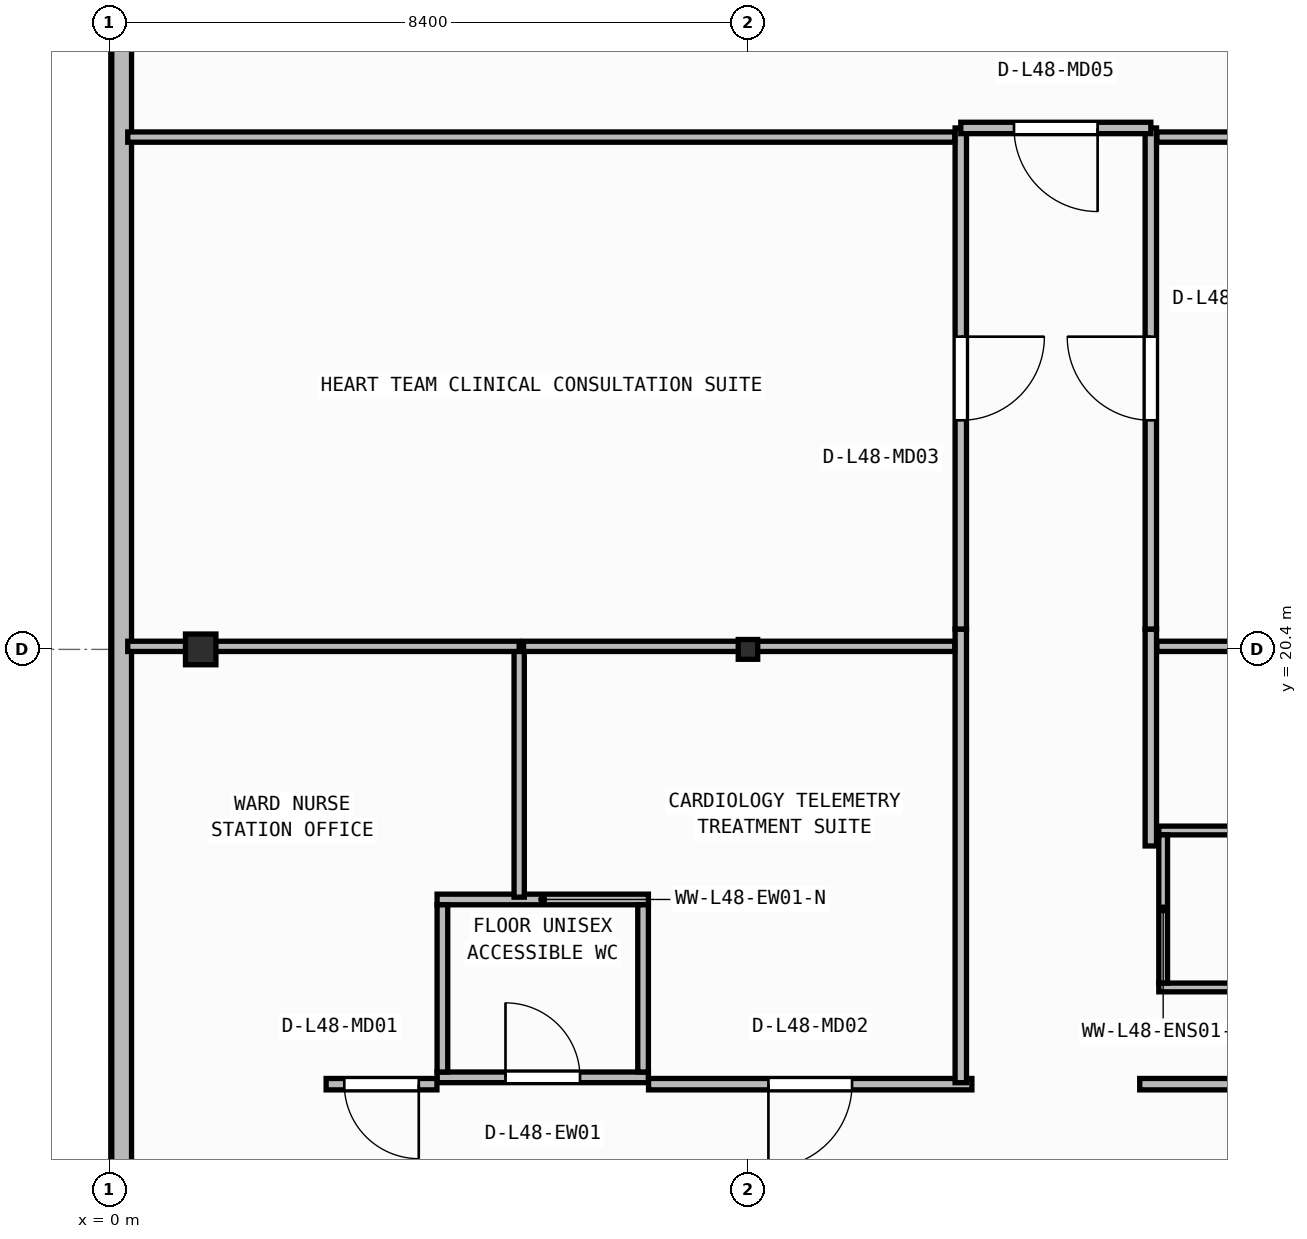
"""IFC4 building model, lengths in metres.
Left out: names, types, materials, properties, quantities, classifications, styles, units other than length and angle.
Written with IfcOpenShell. Run it as: python <this file> out.ifc"""

import sys

from ifc_helpers import new_model, si_unit, direction, frame, frame_2d, origin, origin_2d, place, context, subcontext, project, spatial, rectangle, i_section, extrude, element, fill, save


model = new_model("IFC4")
c1 = context("Model", 3, precision=1e-05, world=origin(), true_north=direction((0.0, 1.0)))
c2 = subcontext(c1, "Body", "Model", "MODEL_VIEW")
j1 = project(units=[si_unit("LENGTHUNIT", "METRE"), si_unit("PLANEANGLEUNIT", "RADIAN")], contexts=[c1])
p1 = place(None, origin())
s1 = spatial("IfcSite", under=j1, at=p1, CompositionType="ELEMENT")
p2 = place(p1, origin())
s2 = spatial("IfcBuilding", under=s1, at=p2, CompositionType="ELEMENT")
p3 = place(p2, frame((0.0, 0.0, 196.05)))
s3 = spatial("IfcBuildingStorey", under=s2, at=p3, CompositionType="ELEMENT", Elevation=196.05)
p4 = place(p3, frame((1.2, 20.4, 0.0), z_axis=(0.0, 0.0, 1.0), x_axis=(1.0, 0.0, 0.0)))
e1 = element("IfcColumn", 1, at=p4, inside=s3, PredefinedType="COLUMN", context=c2, shape_type="SweptSolid", body=[
    extrude(i_section(OverallWidth=0.4, OverallDepth=0.404, WebThickness=0.02, FlangeThickness=0.032, at=origin_2d()), origin(), (0.0, 0.0, 1.0), 3.95),
])
p5 = place(p3, frame((8.4, 20.4, 0.0), z_axis=(0.0, 0.0, 1.0), x_axis=(1.0, 0.0, 0.0)))
e2 = element("IfcColumn", 2, at=p5, inside=s3, PredefinedType="COLUMN", context=c2, shape_type="SweptSolid", body=[
    extrude(i_section(OverallWidth=0.256, OverallDepth=0.26, WebThickness=0.01, FlangeThickness=0.017, FilletRadius=0.013, at=origin_2d()), origin(), (0.0, 0.0, 1.0), 3.95),
])
p6 = place(p3, frame((0.16, 40.14, 0.0), z_axis=(0.0, 0.0, 1.0), x_axis=(0.0, -1.0, 0.0)))
e3 = element("IfcWall", 3, at=p6, inside=s3, PredefinedType="STANDARD", context=c2, shape_type="SweptSolid", body=[
    extrude(rectangle(XDim=37.48, YDim=0.26, at=frame_2d((18.74, 0.0))), origin(), (0.0, 0.0, 1.0), 3.71),
])
p7 = place(p6, frame((27.4, 0.0, 0.9)))
e4 = element("IfcOpeningElement", 4, at=p7, cuts=e3, PredefinedType="OPENING", context=c2, shape_type="SweptSolid", body=[
    extrude(rectangle(XDim=2.4, YDim=1.65, at=frame_2d((1.2, 0.825))), frame((0.0, 0.14, 0.0), z_axis=(0.0, -1.0, 0.0), x_axis=(1.0, 0.0, 0.0)), (0.0, 0.0, 1.0), 0.28),
])
p8 = place(p3, frame((4.31, 14.77, 0.0), z_axis=(0.0, 0.0, 1.0), x_axis=(1.0, 0.0, 0.0)))
e5 = element("IfcWall", 5, at=p8, inside=s3, PredefinedType="PARTITIONING", context=c2, shape_type="SweptSolid", body=[
    extrude(rectangle(XDim=2.78, YDim=0.14, at=frame_2d((1.39, 0.0))), origin(), (0.0, 0.0, 1.0), 3.71),
])
p9 = place(p8, frame((0.9, 0.0, 0.0)))
e6 = element("IfcOpeningElement", 6, at=p9, cuts=e5, PredefinedType="OPENING", context=c2, shape_type="SweptSolid", body=[
    extrude(rectangle(XDim=0.98, YDim=2.1, at=frame_2d((0.49, 1.05))), frame((0.0, 0.08, 0.0), z_axis=(0.0, -1.0, 0.0), x_axis=(1.0, 0.0, 0.0)), (0.0, 0.0, 1.0), 0.16),
])
p10 = place(p3, frame((4.31, 17.11, 0.0), z_axis=(0.0, 0.0, 1.0), x_axis=(1.0, 0.0, 0.0)))
e7 = element("IfcWall", 7, at=p10, inside=s3, PredefinedType="PARTITIONING", context=c2, shape_type="SweptSolid", body=[
    extrude(rectangle(XDim=2.78, YDim=0.14, at=frame_2d((1.39, 0.0))), origin(), (0.0, 0.0, 1.0), 3.71),
])
for number, where, z_axis, x_axis in (
    (8, (4.38, 14.84, 0.0), (0.0, 0.0, 1.0), (0.0, 1.0, 0.0)),
    (9, (7.02, 14.84, 0.0), (0.0, 0.0, 1.0), (0.0, 1.0, 0.0)),
):
    element("IfcWall", number, at=place(p3, frame(where, z_axis=z_axis, x_axis=x_axis)), inside=s3, PredefinedType="PARTITIONING", context=c2, shape_type="SweptSolid", body=[
        extrude(rectangle(XDim=2.2, YDim=0.14, at=frame_2d((1.1, 0.0))), origin(), (0.0, 0.0, 1.0), 3.71),
    ])
for number, where, z_axis, x_axis in (
    (10, (13.805, 15.952, 0.0), (0.0, 0.0, 1.0), (1.0, 0.0, 0.0)),
    (11, (13.805, 18.018, 0.0), (0.0, 0.0, 1.0), (1.0, 0.0, 0.0)),
):
    element("IfcWall", number, at=place(p3, frame(where, z_axis=z_axis, x_axis=x_axis)), inside=s3, PredefinedType="PARTITIONING", context=c2, shape_type="SweptSolid", body=[
        extrude(rectangle(XDim=2.15, YDim=0.115, at=frame_2d((1.075, 0.0))), origin(), (0.0, 0.0, 1.0), 3.71),
    ])
p11 = place(p3, frame((13.863, 16.01, 0.0), z_axis=(0.0, 0.0, 1.0), x_axis=(0.0, 1.0, 0.0)))
e12 = element("IfcWall", 12, at=p11, inside=s3, PredefinedType="PARTITIONING", context=c2, shape_type="SweptSolid", body=[
    extrude(rectangle(XDim=1.95, YDim=0.115, at=frame_2d((0.975, 0.0))), origin(), (0.0, 0.0, 1.0), 3.71),
])
p12 = place(p3, frame((4.308, 14.68, 0.0), z_axis=(0.0, 0.0, 1.0), x_axis=(-1.0, 0.0, 0.0)))
e13 = element("IfcWall", 13, at=p12, inside=s3, PredefinedType="PARTITIONING", context=c2, shape_type="SweptSolid", body=[
    extrude(rectangle(XDim=1.458, YDim=0.15, at=frame_2d((0.729, 0.0))), origin(), (0.0, 0.0, 1.0), 3.71),
])
p13 = place(p12, frame((0.239, 0.0, 0.0)))
e14 = element("IfcOpeningElement", 14, at=p13, cuts=e13, PredefinedType="OPENING", context=c2, shape_type="SweptSolid", body=[
    extrude(rectangle(XDim=0.98, YDim=2.1, at=frame_2d((0.49, 1.05))), frame((0.0, 0.085, 0.0), z_axis=(0.0, -1.0, 0.0), x_axis=(1.0, 0.0, 0.0)), (0.0, 0.0, 1.0), 0.17),
])
p14 = place(p3, frame((11.346, 14.68, 0.0), z_axis=(0.0, 0.0, 1.0), x_axis=(-1.0, 0.0, 0.0)))
e15 = element("IfcWall", 15, at=p14, inside=s3, PredefinedType="PARTITIONING", context=c2, shape_type="SweptSolid", body=[
    extrude(rectangle(XDim=4.254, YDim=0.15, at=frame_2d((2.127, 0.0))), origin(), (0.0, 0.0, 1.0), 3.71),
])
p15 = place(p14, frame((1.577, 0.0, 0.0)))
e16 = element("IfcOpeningElement", 16, at=p15, cuts=e15, PredefinedType="OPENING", context=c2, shape_type="SweptSolid", body=[
    extrude(rectangle(XDim=1.1, YDim=2.1, at=frame_2d((0.55, 1.05))), frame((0.0, 0.085, 0.0), z_axis=(0.0, -1.0, 0.0), x_axis=(1.0, 0.0, 0.0)), (0.0, 0.0, 1.0), 0.17),
])
p16 = place(p3, frame((18.966, 14.68, 0.0), z_axis=(0.0, 0.0, 1.0), x_axis=(-1.0, 0.0, 0.0)))
e17 = element("IfcWall", 17, at=p16, inside=s3, PredefinedType="PARTITIONING", context=c2, shape_type="SweptSolid", body=[
    extrude(rectangle(XDim=5.412, YDim=0.15, at=frame_2d((2.706, 0.0))), origin(), (0.0, 0.0, 1.0), 3.71),
])
p17 = place(p16, frame((2.056, 0.0, 0.0)))
e18 = element("IfcOpeningElement", 18, at=p17, cuts=e17, PredefinedType="OPENING", context=c2, shape_type="SweptSolid", body=[
    extrude(rectangle(XDim=1.3, YDim=2.15, at=frame_2d((0.65, 1.075))), frame((0.0, 0.085, 0.0), z_axis=(0.0, -1.0, 0.0), x_axis=(1.0, 0.0, 0.0)), (0.0, 0.0, 1.0), 0.17),
])
p18 = place(p3, frame((11.2, 20.666, 0.0), z_axis=(0.0, 0.0, 1.0), x_axis=(0.0, -1.0, 0.0)))
e19 = element("IfcWall", 19, at=p18, inside=s3, PredefinedType="PARTITIONING", context=c2, shape_type="SweptSolid", body=[
    extrude(rectangle(XDim=5.966, YDim=0.15, at=frame_2d((2.983, 0.0))), origin(), (0.0, 0.0, 1.0), 3.71),
])
p19 = place(p3, frame((13.7, 17.814, 0.0), z_axis=(0.0, 0.0, 1.0), x_axis=(0.0, 1.0, 0.0)))
e20 = element("IfcWall", 20, at=p19, inside=s3, PredefinedType="PARTITIONING", context=c2, shape_type="SweptSolid", body=[
    extrude(rectangle(XDim=2.852, YDim=0.15, at=frame_2d((1.426, 0.0))), origin(), (0.0, 0.0, 1.0), 3.71),
])
p20 = place(p3, frame((11.2, 27.26, 0.0), z_axis=(0.0, 0.0, 1.0), x_axis=(0.0, -1.0, 0.0)))
e21 = element("IfcWall", 21, at=p20, inside=s3, PredefinedType="PARTITIONING", context=c2, shape_type="SweptSolid", body=[
    extrude(rectangle(XDim=6.592, YDim=0.15, at=frame_2d((3.296, 0.0))), origin(), (0.0, 0.0, 1.0), 3.71),
])
p21 = place(p20, frame((2.746, 0.0, 0.0)))
e22 = element("IfcOpeningElement", 22, at=p21, cuts=e21, PredefinedType="OPENING", context=c2, shape_type="SweptSolid", body=[
    extrude(rectangle(XDim=1.1, YDim=2.1, at=frame_2d((0.55, 1.05))), frame((0.0, 0.085, 0.0), z_axis=(0.0, -1.0, 0.0), x_axis=(1.0, 0.0, 0.0)), (0.0, 0.0, 1.0), 0.17),
])
p22 = place(p3, frame((13.7, 20.668, 0.0), z_axis=(0.0, 0.0, 1.0), x_axis=(0.0, 1.0, 0.0)))
e23 = element("IfcWall", 23, at=p22, inside=s3, PredefinedType="PARTITIONING", context=c2, shape_type="SweptSolid", body=[
    extrude(rectangle(XDim=6.592, YDim=0.15, at=frame_2d((3.296, 0.0))), origin(), (0.0, 0.0, 1.0), 3.71),
])
p23 = place(p22, frame((2.746, 0.0, 0.0)))
e24 = element("IfcOpeningElement", 24, at=p23, cuts=e23, PredefinedType="OPENING", context=c2, shape_type="SweptSolid", body=[
    extrude(rectangle(XDim=1.1, YDim=2.1, at=frame_2d((0.55, 1.05))), frame((0.0, 0.085, 0.0), z_axis=(0.0, -1.0, 0.0), x_axis=(1.0, 0.0, 0.0)), (0.0, 0.0, 1.0), 0.17),
])
p24 = place(p3, frame((13.7, 27.26, 0.0), z_axis=(0.0, 0.0, 1.0), x_axis=(-1.0, 0.0, 0.0)))
e25 = element("IfcWall", 25, at=p24, inside=s3, PredefinedType="PARTITIONING", context=c2, shape_type="SweptSolid", body=[
    extrude(rectangle(XDim=2.5, YDim=0.15, at=frame_2d((1.25, 0.0))), origin(), (0.0, 0.0, 1.0), 3.71),
])
p25 = place(p24, frame((0.7, 0.0, 0.0)))
e26 = element("IfcOpeningElement", 26, at=p25, cuts=e25, PredefinedType="OPENING", context=c2, shape_type="SweptSolid", body=[
    extrude(rectangle(XDim=1.1, YDim=2.1, at=frame_2d((0.55, 1.05))), frame((0.0, 0.085, 0.0), z_axis=(0.0, -1.0, 0.0), x_axis=(1.0, 0.0, 0.0)), (0.0, 0.0, 1.0), 0.17),
])
p26 = place(p3, frame((5.39, 17.14, 0.0), z_axis=(0.0, 0.0, 1.0), x_axis=(0.0, 1.0, 0.0)))
e27 = element("IfcWall", 27, at=p26, inside=s3, PredefinedType="PARTITIONING", context=c2, shape_type="SweptSolid", body=[
    extrude(rectangle(XDim=3.3, YDim=0.135, at=frame_2d((1.65, 0.0))), origin(), (0.0, 0.0, 1.0), 3.71),
])
p27 = place(p3, frame((5.39, 20.44, 0.0), z_axis=(0.0, 0.0, 1.0), x_axis=(-1.0, 0.0, 0.0)))
e28 = element("IfcWall", 28, at=p27, inside=s3, PredefinedType="PARTITIONING", context=c2, shape_type="SweptSolid", body=[
    extrude(rectangle(XDim=5.15, YDim=0.135, at=frame_2d((2.575, 0.0))), origin(), (0.0, 0.0, 1.0), 3.152),
])
p28 = place(p3, frame((11.12, 20.44, 0.0), z_axis=(0.0, 0.0, 1.0), x_axis=(-1.0, 0.0, 0.0)))
e29 = element("IfcWall", 29, at=p28, inside=s3, PredefinedType="PARTITIONING", context=c2, shape_type="SweptSolid", body=[
    extrude(rectangle(XDim=5.673, YDim=0.135, at=frame_2d((2.836, 0.0))), origin(), (0.0, 0.0, 1.0), 3.152),
])
p29 = place(p3, frame((18.74, 20.44, 0.0), z_axis=(0.0, 0.0, 1.0), x_axis=(-1.0, 0.0, 0.0)))
e30 = element("IfcWall", 30, at=p29, inside=s3, PredefinedType="PARTITIONING", context=c2, shape_type="SweptSolid", body=[
    extrude(rectangle(XDim=4.96, YDim=0.135, at=frame_2d((2.48, 0.0))), origin(), (0.0, 0.0, 1.0), 3.152),
])
p30 = place(p3, frame((11.12, 27.14, 0.0), z_axis=(0.0, 0.0, 1.0), x_axis=(-1.0, 0.0, 0.0)))
e31 = element("IfcWall", 31, at=p30, inside=s3, PredefinedType="PARTITIONING", context=c2, shape_type="SweptSolid", body=[
    extrude(rectangle(XDim=10.88, YDim=0.135, at=frame_2d((5.44, 0.0))), origin(), (0.0, 0.0, 1.0), 3.71),
])
p31 = place(p3, frame((16.518, 27.14, 0.0), z_axis=(0.0, 0.0, 1.0), x_axis=(-1.0, 0.0, 0.0)))
e32 = element("IfcWall", 32, at=p31, inside=s3, PredefinedType="PARTITIONING", context=c2, shape_type="SweptSolid", body=[
    extrude(rectangle(XDim=2.738, YDim=0.135, at=frame_2d((1.369, 0.0))), origin(), (0.0, 0.0, 1.0), 3.71),
])
p32 = place(p9, origin())
e33 = element("IfcDoor", 33, at=p32, inside=s3, OperationType="SINGLE_SWING_LEFT", PredefinedType="DOOR", context=c2, shape_type="SweptSolid", body=[
    extrude(rectangle(XDim=0.98, YDim=2.1, at=frame_2d((0.49, 1.05))), frame((0.0, 0.025, 0.0), z_axis=(0.0, -1.0, 0.0), x_axis=(1.0, 0.0, 0.0)), (0.0, 0.0, 1.0), 0.05),
])
fill(e6, e33)
p33 = place(p13, origin())
e34 = element("IfcDoor", 34, at=p33, inside=s3, OperationType="SINGLE_SWING_LEFT", PredefinedType="DOOR", context=c2, shape_type="SweptSolid", body=[
    extrude(rectangle(XDim=0.98, YDim=2.1, at=frame_2d((0.49, 1.05))), frame((0.0, 0.025, 0.0), z_axis=(0.0, -1.0, 0.0), x_axis=(1.0, 0.0, 0.0)), (0.0, 0.0, 1.0), 0.05),
])
fill(e14, e34)
p34 = place(p15, origin())
e35 = element("IfcDoor", 35, at=p34, inside=s3, OperationType="SINGLE_SWING_RIGHT", PredefinedType="DOOR", context=c2, shape_type="SweptSolid", body=[
    extrude(rectangle(XDim=1.1, YDim=2.1, at=frame_2d((0.55, 1.05))), frame((0.0, 0.025, 0.0), z_axis=(0.0, -1.0, 0.0), x_axis=(1.0, 0.0, 0.0)), (0.0, 0.0, 1.0), 0.05),
])
fill(e16, e35)
p35 = place(p21, origin())
e36 = element("IfcDoor", 36, at=p35, inside=s3, OperationType="SINGLE_SWING_LEFT", PredefinedType="DOOR", context=c2, shape_type="SweptSolid", body=[
    extrude(rectangle(XDim=1.1, YDim=2.1, at=frame_2d((0.55, 1.05))), frame((0.0, 0.025, 0.0), z_axis=(0.0, -1.0, 0.0), x_axis=(1.0, 0.0, 0.0)), (0.0, 0.0, 1.0), 0.05),
])
fill(e22, e36)
p36 = place(p23, origin())
e37 = element("IfcDoor", 37, at=p36, inside=s3, OperationType="SINGLE_SWING_RIGHT", PredefinedType="DOOR", context=c2, shape_type="SweptSolid", body=[
    extrude(rectangle(XDim=1.1, YDim=2.1, at=frame_2d((0.55, 1.05))), frame((0.0, 0.025, 0.0), z_axis=(0.0, -1.0, 0.0), x_axis=(1.0, 0.0, 0.0)), (0.0, 0.0, 1.0), 0.05),
])
fill(e24, e37)
p37 = place(p25, origin())
e38 = element("IfcDoor", 38, at=p37, inside=s3, OperationType="SINGLE_SWING_LEFT", PredefinedType="DOOR", context=c2, shape_type="SweptSolid", body=[
    extrude(rectangle(XDim=1.1, YDim=2.1, at=frame_2d((0.55, 1.05))), frame((0.0, 0.025, 0.0), z_axis=(0.0, -1.0, 0.0), x_axis=(1.0, 0.0, 0.0)), (0.0, 0.0, 1.0), 0.05),
])
fill(e26, e38)
save(model, sys.argv[1])
